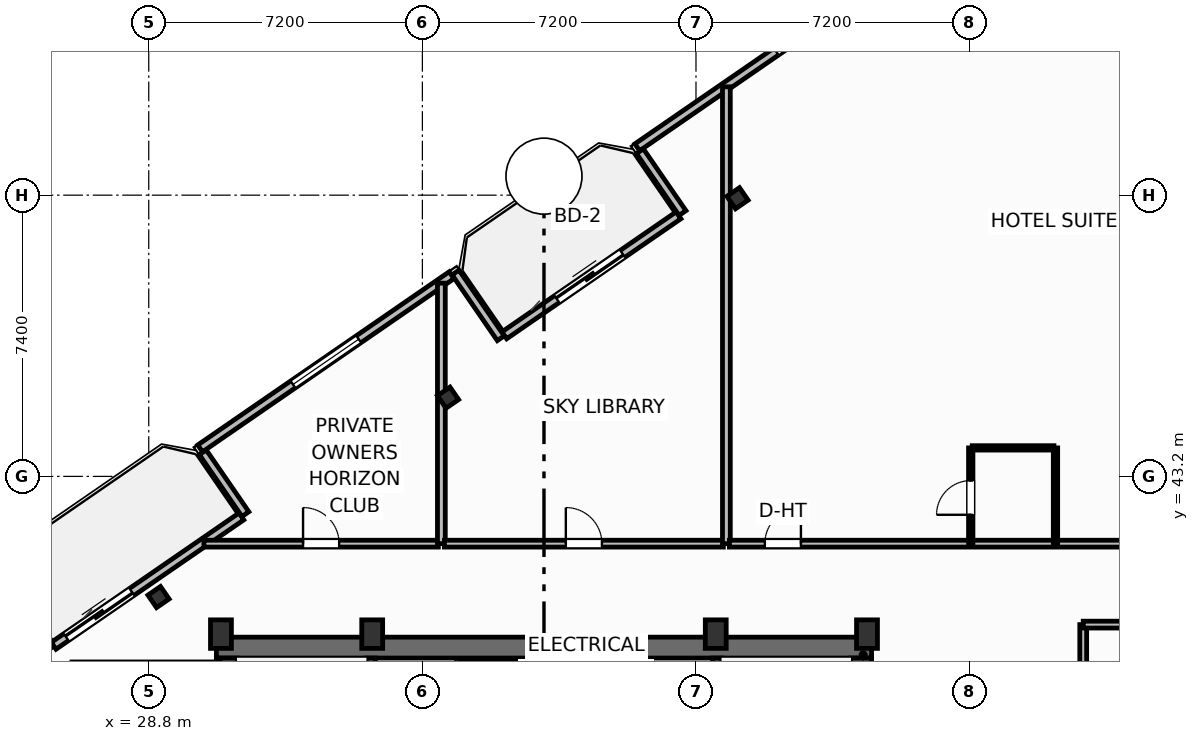
"""IFC4 building model, lengths in metres.
Left out: names, types, materials, properties, quantities, classifications, styles, units other than length and angle.
Written with IfcOpenShell. Run it as: python <this file> out.ifc"""

import sys

from ifc_helpers import new_model, si_unit, direction, frame, frame_2d, origin, origin_2d, place, context, subcontext, project, spatial, rectangle, i_section, extrude, element, fill, save


model = new_model("IFC4")
c1 = context("Model", 3, precision=1e-05, world=origin(), true_north=direction((0.0, 1.0)))
c2 = subcontext(c1, "Body", "Model", "MODEL_VIEW")
j1 = project(units=[si_unit("LENGTHUNIT", "METRE"), si_unit("PLANEANGLEUNIT", "RADIAN")], contexts=[c1])
p1 = place(None, origin())
s1 = spatial("IfcSite", under=j1, at=p1, CompositionType="ELEMENT")
p2 = place(p1, origin())
s2 = spatial("IfcBuilding", under=s1, at=p2, CompositionType="ELEMENT")
p3 = place(p2, frame((0.0, 0.0, 258.2)))
s3 = spatial("IfcBuildingStorey", under=s2, at=p3, CompositionType="ELEMENT", Elevation=258.2)
for number, where, z_axis, x_axis in (
    (1, (30.7, 39.05, 0.0), (0.0, 0.0, 1.0), (1.0, 0.0, 0.0)),
    (2, (34.68, 39.05, 0.0), (0.0, 0.0, 1.0), (1.0, 0.0, 0.0)),
    (3, (43.72, 39.05, 0.0), (0.0, 0.0, 1.0), (1.0, 0.0, 0.0)),
    (4, (47.7, 39.05, 0.0), (0.0, 0.0, 1.0), (1.0, 0.0, 0.0)),
):
    element("IfcColumn", number, at=place(p3, frame(where, z_axis=z_axis, x_axis=x_axis)), inside=s3, PredefinedType="COLUMN", context=c2, shape_type="SweptSolid", body=[
        extrude(rectangle(XDim=0.55, YDim=0.75, at=origin_2d()), origin(), (0.0, 0.0, 1.0), 3.7),
    ])
p4 = place(p3, frame((30.58, 38.695, 0.0), z_axis=(0.0, 0.0, 1.0), x_axis=(1.0, 0.0, 0.0)))
e5 = element("IfcWall", 5, at=p4, inside=s3, PredefinedType="SHEAR", context=c2, shape_type="SweptSolid", body=[
    extrude(rectangle(XDim=17.24, YDim=0.55, at=frame_2d((8.62, 0.0))), origin(), (0.0, 0.0, 1.0), 3.45),
])
for number, where, z_axis, x_axis in (
    (6, (30.855, 29.2, 0.0), (0.0, 0.0, 1.0), (0.0, 1.0, 0.0)),
    (7, (47.545, 29.2, 0.0), (0.0, 0.0, 1.0), (0.0, 1.0, 0.0)),
):
    element("IfcWall", number, at=place(p3, frame(where, z_axis=z_axis, x_axis=x_axis)), inside=s3, PredefinedType="SHEAR", context=c2, shape_type="SweptSolid", body=[
        extrude(rectangle(XDim=9.22, YDim=0.55, at=frame_2d((4.61, 0.0))), origin(), (0.0, 0.0, 1.0), 3.45),
    ])
p5 = place(p3, frame((34.64, 29.2, 0.0), z_axis=(0.0, 0.0, 1.0), x_axis=(0.0, 1.0, 0.0)))
e8 = element("IfcWall", 8, at=p5, inside=s3, PredefinedType="SHEAR", context=c2, shape_type="SweptSolid", body=[
    extrude(rectangle(XDim=9.22, YDim=0.25, at=frame_2d((4.61, 0.0))), origin(), (0.0, 0.0, 1.0), 3.45),
])
p6 = place(p5, frame((0.65, 0.0, 0.0)))
e9 = element("IfcOpeningElement", 9, at=p6, cuts=e8, PredefinedType="OPENING", context=c2, shape_type="SweptSolid", body=[
    extrude(rectangle(XDim=1.05, YDim=2.15, at=frame_2d((0.525, 1.075))), frame((0.0, 0.135, 0.0), z_axis=(0.0, -1.0, 0.0), x_axis=(1.0, 0.0, 0.0)), (0.0, 0.0, 1.0), 0.27),
])
p7 = place(p3, frame((43.76, 29.2, 0.0), z_axis=(0.0, 0.0, 1.0), x_axis=(0.0, 1.0, 0.0)))
e10 = element("IfcWall", 10, at=p7, inside=s3, PredefinedType="SHEAR", context=c2, shape_type="SweptSolid", body=[
    extrude(rectangle(XDim=9.22, YDim=0.25, at=frame_2d((4.61, 0.0))), origin(), (0.0, 0.0, 1.0), 3.45),
])
p8 = place(p7, frame((0.65, 0.0, 0.0)))
e11 = element("IfcOpeningElement", 11, at=p8, cuts=e10, PredefinedType="OPENING", context=c2, shape_type="SweptSolid", body=[
    extrude(rectangle(XDim=1.05, YDim=2.15, at=frame_2d((0.525, 1.075))), frame((0.0, 0.135, 0.0), z_axis=(0.0, -1.0, 0.0), x_axis=(1.0, 0.0, 0.0)), (0.0, 0.0, 1.0), 0.27),
])
for number, where, z_axis, x_axis in (
    (12, (44.292, 50.519, 0.0), (0.0, 0.0, 1.0), (0.824, 0.567, 0.0)),
    (13, (36.675, 45.272, 0.0), (0.0, 0.0, 1.0), (0.824, 0.567, 0.0)),
    (14, (29.057, 40.025, 0.0), (0.0, 0.0, 1.0), (0.824, 0.567, 0.0)),
):
    element("IfcColumn", number, at=place(p3, frame(where, z_axis=z_axis, x_axis=x_axis)), inside=s3, PredefinedType="COLUMN", context=c2, shape_type="SweptSolid", body=[
        extrude(i_section(OverallWidth=0.401, OverallDepth=0.399, WebThickness=0.025, FlangeThickness=0.04, FilletRadius=0.022, at=origin_2d()), origin(), (0.0, 0.0, 1.0), 3.7),
    ])
p9 = place(p3, frame((26.297, 38.743, 0.0), z_axis=(0.0, 0.0, 1.0), x_axis=(0.823534636215, 0.567265989598, 0.0)))
e15 = element("IfcWall", 15, at=p9, inside=s3, PredefinedType="SOLIDWALL", context=c2, shape_type="SweptSolid", body=[
    extrude(rectangle(XDim=6.0, YDim=0.22, at=frame_2d((3.0, 0.0))), origin(), (0.0, 0.0, 1.0), 2.73),
])
p10 = place(p9, frame((0.4, 0.0, 0.0)))
e16 = element("IfcOpeningElement", 16, at=p10, cuts=e15, PredefinedType="OPENING", context=c2, shape_type="SweptSolid", body=[
    extrude(rectangle(XDim=2.1, YDim=2.3, at=frame_2d((1.05, 1.15))), frame((0.0, 0.12, 0.0), z_axis=(0.0, -1.0, 0.0), x_axis=(1.0, 0.0, 0.0)), (0.0, 0.0, 1.0), 0.24),
])
p11 = place(p3, frame((38.156, 46.912, 0.0), z_axis=(0.0, 0.0, 1.0), x_axis=(0.823527178548, 0.567276816195, 0.0)))
e17 = element("IfcWall", 17, at=p11, inside=s3, PredefinedType="SOLIDWALL", context=c2, shape_type="SweptSolid", body=[
    extrude(rectangle(XDim=5.567, YDim=0.22, at=frame_2d((2.783, 0.0))), origin(), (0.0, 0.0, 1.0), 2.73),
])
p12 = place(p11, frame((1.68, 0.0, 0.0)))
e18 = element("IfcOpeningElement", 18, at=p12, cuts=e17, PredefinedType="OPENING", context=c2, shape_type="SweptSolid", body=[
    extrude(rectangle(XDim=2.1, YDim=2.3, at=frame_2d((1.05, 1.15))), frame((0.0, 0.12, 0.0), z_axis=(0.0, -1.0, 0.0), x_axis=(1.0, 0.0, 0.0)), (0.0, 0.0, 1.0), 0.24),
])
p13 = place(p3, frame((50.697, 58.087, 0.0), z_axis=(0.0, 0.0, 1.0), x_axis=(-0.823539455464, -0.567258993137, 0.0)))
e19 = element("IfcWall", 19, at=p13, inside=s3, PredefinedType="SOLIDWALL", context=c2, shape_type="SweptSolid", body=[
    extrude(rectangle(XDim=10.98, YDim=0.22, at=frame_2d((5.49, 0.0))), origin(), (0.0, 0.0, 1.0), 2.73),
])
p14 = place(p13, frame((4.44, 0.0, 0.8)))
e20 = element("IfcOpeningElement", 20, at=p14, cuts=e19, PredefinedType="OPENING", context=c2, shape_type="SweptSolid", body=[
    extrude(rectangle(XDim=2.1, YDim=1.75, at=frame_2d((1.05, 0.875))), frame((0.0, 0.12, 0.0), z_axis=(0.0, -1.0, 0.0), x_axis=(1.0, 0.0, 0.0)), (0.0, 0.0, 1.0), 0.24),
])
p15 = place(p3, frame((41.725, 51.756, 0.0), z_axis=(0.0, 0.0, 1.0), x_axis=(0.567273565974, -0.823529417415, 0.0)))
e21 = element("IfcWall", 21, at=p15, inside=s3, PredefinedType="SOLIDWALL", context=c2, shape_type="SweptSolid", body=[
    extrude(rectangle(XDim=1.975, YDim=0.22, at=frame_2d((0.988, 0.0))), origin(), (0.0, 0.0, 1.0), 2.73),
])
p16 = place(p3, frame((38.063, 46.835, 0.0), z_axis=(0.0, 0.0, 1.0), x_axis=(-0.567219383419, 0.823566737474, 0.0)))
e22 = element("IfcWall", 22, at=p16, inside=s3, PredefinedType="SOLIDWALL", context=c2, shape_type="SweptSolid", body=[
    extrude(rectangle(XDim=2.1, YDim=0.22, at=frame_2d((1.05, 0.0))), origin(), (0.0, 0.0, 1.0), 2.73),
])
p17 = place(p3, frame((36.769, 48.494, 0.0), z_axis=(0.0, 0.0, 1.0), x_axis=(-0.823521165086, -0.56728554596, 0.0)))
e23 = element("IfcWall", 23, at=p17, inside=s3, PredefinedType="SOLIDWALL", context=c2, shape_type="SweptSolid", body=[
    extrude(rectangle(XDim=8.035, YDim=0.22, at=frame_2d((4.018, 0.0))), origin(), (0.0, 0.0, 1.0), 2.73),
])
p18 = place(p17, frame((2.968, 0.0, 0.8)))
e24 = element("IfcOpeningElement", 24, at=p18, cuts=e23, PredefinedType="OPENING", context=c2, shape_type="SweptSolid", body=[
    extrude(rectangle(XDim=2.1, YDim=1.75, at=frame_2d((1.05, 0.875))), frame((0.0, 0.12, 0.0), z_axis=(0.0, -1.0, 0.0), x_axis=(1.0, 0.0, 0.0)), (0.0, 0.0, 1.0), 0.24),
])
p19 = place(p3, frame((30.223, 43.833, 0.0), z_axis=(0.0, 0.0, 1.0), x_axis=(0.567215821234, -0.823569190865, 0.0)))
e25 = element("IfcWall", 25, at=p19, inside=s3, PredefinedType="SOLIDWALL", context=c2, shape_type="SweptSolid", body=[
    extrude(rectangle(XDim=1.975, YDim=0.22, at=frame_2d((0.988, 0.0))), origin(), (0.0, 0.0, 1.0), 2.73),
])
p20 = place(p3, frame((26.204, 38.667, 0.0), z_axis=(0.0, 0.0, 1.0), x_axis=(-0.567219383419, 0.823566737474, 0.0)))
e26 = element("IfcWall", 26, at=p20, inside=s3, PredefinedType="SOLIDWALL", context=c2, shape_type="SweptSolid", body=[
    extrude(rectangle(XDim=2.1, YDim=0.22, at=frame_2d((1.05, 0.0))), origin(), (0.0, 0.0, 1.0), 2.73),
])
p21 = place(p3, frame((30.251, 41.43, 0.0), z_axis=(0.0, 0.0, 1.0), x_axis=(1.0, 0.0, 0.0)))
e27 = element("IfcWall", 27, at=p21, inside=s3, PredefinedType="PARTITIONING", context=c2, shape_type="SweptSolid", body=[
    extrude(rectangle(XDim=6.169, YDim=0.18, at=frame_2d((3.084, 0.0))), origin(), (0.0, 0.0, 1.0), 3.45),
])
p22 = place(p21, frame((2.609, 0.0, 0.0)))
e28 = element("IfcOpeningElement", 28, at=p22, cuts=e27, PredefinedType="OPENING", context=c2, shape_type="SweptSolid", body=[
    extrude(rectangle(XDim=0.95, YDim=2.05, at=frame_2d((0.475, 1.025))), frame((0.0, 0.1, 0.0), z_axis=(0.0, -1.0, 0.0), x_axis=(1.0, 0.0, 0.0)), (0.0, 0.0, 1.0), 0.2),
])
p23 = place(p3, frame((36.5, 41.43, 0.0), z_axis=(0.0, 0.0, 1.0), x_axis=(0.0, 1.0, 0.0)))
e29 = element("IfcWall", 29, at=p23, inside=s3, PredefinedType="PARTITIONING", context=c2, shape_type="SweptSolid", body=[
    extrude(rectangle(XDim=6.854, YDim=0.205, at=frame_2d((3.427, 0.0))), origin(), (0.0, 0.0, 1.0), 2.739),
])
p24 = place(p3, frame((36.58, 41.43, 0.0), z_axis=(0.0, 0.0, 1.0), x_axis=(1.0, 0.0, 0.0)))
e30 = element("IfcWall", 30, at=p24, inside=s3, PredefinedType="PARTITIONING", context=c2, shape_type="SweptSolid", body=[
    extrude(rectangle(XDim=7.34, YDim=0.18, at=frame_2d((3.67, 0.0))), origin(), (0.0, 0.0, 1.0), 3.45),
])
p25 = place(p24, frame((3.195, 0.0, 0.0)))
e31 = element("IfcOpeningElement", 31, at=p25, cuts=e30, PredefinedType="OPENING", context=c2, shape_type="SweptSolid", body=[
    extrude(rectangle(XDim=0.95, YDim=2.05, at=frame_2d((0.475, 1.025))), frame((0.0, 0.1, 0.0), z_axis=(0.0, -1.0, 0.0), x_axis=(1.0, 0.0, 0.0)), (0.0, 0.0, 1.0), 0.2),
])
p26 = place(p3, frame((44.0, 41.43, 0.0), z_axis=(0.0, 0.0, 1.0), x_axis=(0.0, 1.0, 0.0)))
e32 = element("IfcWall", 32, at=p26, inside=s3, PredefinedType="PARTITIONING", context=c2, shape_type="SweptSolid", body=[
    extrude(rectangle(XDim=12.021, YDim=0.205, at=frame_2d((6.01, 0.0))), origin(), (0.0, 0.0, 1.0), 2.739),
])
p27 = place(p3, frame((44.08, 41.43, 0.0), z_axis=(0.0, 0.0, 1.0), x_axis=(1.0, 0.0, 0.0)))
e33 = element("IfcWall", 33, at=p27, inside=s3, PredefinedType="PARTITIONING", context=c2, shape_type="SweptSolid", body=[
    extrude(rectangle(XDim=23.992, YDim=0.18, at=frame_2d((11.996, 0.0))), origin(), (0.0, 0.0, 1.0), 3.45),
])
p28 = place(p27, frame((0.931, 0.0, 0.0)))
e34 = element("IfcOpeningElement", 34, at=p28, cuts=e33, PredefinedType="OPENING", context=c2, shape_type="SweptSolid", body=[
    extrude(rectangle(XDim=0.95, YDim=2.15, at=frame_2d((0.475, 1.075))), frame((0.0, 0.1, 0.0), z_axis=(0.0, -1.0, 0.0), x_axis=(1.0, 0.0, 0.0)), (0.0, 0.0, 1.0), 0.2),
])
p29 = place(p3, frame((50.47, 43.95, 0.0), z_axis=(0.0, 0.0, 1.0), x_axis=(1.0, 0.0, 0.0)))
e35 = element("IfcWall", 35, at=p29, inside=s3, PredefinedType="PARTITIONING", context=c2, shape_type="SweptSolid", body=[
    extrude(rectangle(XDim=2.15, YDim=0.115, at=frame_2d((1.075, 0.0))), origin(), (0.0, 0.0, 1.0), 3.45),
])
p30 = place(p3, frame((50.43, 41.43, 0.0), z_axis=(0.0, 0.0, 1.0), x_axis=(0.0, 1.0, 0.0)))
e36 = element("IfcWall", 36, at=p30, inside=s3, PredefinedType="PARTITIONING", context=c2, shape_type="SweptSolid", body=[
    extrude(rectangle(XDim=2.52, YDim=0.115, at=frame_2d((1.26, 0.0))), origin(), (0.0, 0.0, 1.0), 3.45),
])
p31 = place(p30, frame((0.76, 0.0, 0.0)))
e37 = element("IfcOpeningElement", 37, at=p31, cuts=e36, PredefinedType="OPENING", context=c2, shape_type="SweptSolid", body=[
    extrude(rectangle(XDim=0.9, YDim=2.05, at=frame_2d((0.45, 1.025))), frame((0.0, 0.067, 0.0), z_axis=(0.0, -1.0, 0.0), x_axis=(1.0, 0.0, 0.0)), (0.0, 0.0, 1.0), 0.135),
])
p32 = place(p3, frame((52.66, 41.43, 0.0), z_axis=(0.0, 0.0, 1.0), x_axis=(0.0, 1.0, 0.0)))
e38 = element("IfcWall", 38, at=p32, inside=s3, PredefinedType="PARTITIONING", context=c2, shape_type="SweptSolid", body=[
    extrude(rectangle(XDim=2.52, YDim=0.115, at=frame_2d((1.26, 0.0))), origin(), (0.0, 0.0, 1.0), 3.45),
])
p33 = place(p3, frame((53.39, 19.24, 0.0), z_axis=(0.0, 0.0, 1.0), x_axis=(0.0, 1.0, 0.0)))
e39 = element("IfcWall", 39, at=p33, inside=s3, PredefinedType="PARTITIONING", context=c2, shape_type="SweptSolid", body=[
    extrude(rectangle(XDim=20.06, YDim=0.18, at=frame_2d((10.03, 0.0))), origin(), (0.0, 0.0, 1.0), 3.45),
])
p34 = place(p33, frame((7.7, 0.0, 0.0)))
e40 = element("IfcOpeningElement", 40, at=p34, cuts=e39, PredefinedType="OPENING", context=c2, shape_type="SweptSolid", body=[
    extrude(rectangle(XDim=0.95, YDim=2.05, at=frame_2d((0.475, 1.025))), frame((0.0, 0.1, 0.0), z_axis=(0.0, -1.0, 0.0), x_axis=(1.0, 0.0, 0.0)), (0.0, 0.0, 1.0), 0.2),
])
p35 = place(p3, frame((53.39, 39.3, 0.0), z_axis=(0.0, 0.0, 1.0), x_axis=(1.0, 0.0, 0.0)))
e41 = element("IfcWall", 41, at=p35, inside=s3, PredefinedType="PARTITIONING", context=c2, shape_type="SweptSolid", body=[
    extrude(rectangle(XDim=16.149, YDim=0.18, at=frame_2d((8.075, 0.0))), origin(), (0.0, 0.0, 1.0), 2.739),
])
p36 = place(p10, origin())
e42 = element("IfcDoor", 42, at=p36, inside=s3, OperationType="SLIDING_TO_LEFT", PredefinedType="DOOR", context=c2, shape_type="SweptSolid", body=[
    extrude(rectangle(XDim=2.1, YDim=2.3, at=frame_2d((1.05, 1.15))), frame((0.0, 0.025, 0.0), z_axis=(0.0, -1.0, 0.0), x_axis=(1.0, 0.0, 0.0)), (0.0, 0.0, 1.0), 0.05),
])
fill(e16, e42)
p37 = place(p12, origin())
e43 = element("IfcDoor", 43, at=p37, inside=s3, OperationType="SLIDING_TO_LEFT", PredefinedType="DOOR", context=c2, shape_type="SweptSolid", body=[
    extrude(rectangle(XDim=2.1, YDim=2.3, at=frame_2d((1.05, 1.15))), frame((0.0, 0.025, 0.0), z_axis=(0.0, -1.0, 0.0), x_axis=(1.0, 0.0, 0.0)), (0.0, 0.0, 1.0), 0.05),
])
fill(e18, e43)
p38 = place(p14, origin())
e44 = element("IfcWindow", 44, at=p38, inside=s3, PartitioningType="SINGLE_PANEL", PredefinedType="WINDOW", context=c2, shape_type="SweptSolid", body=[
    extrude(rectangle(XDim=2.1, YDim=1.75, at=frame_2d((1.05, 0.875))), frame((0.0, 0.03, 0.0), z_axis=(0.0, -1.0, 0.0), x_axis=(1.0, 0.0, 0.0)), (0.0, 0.0, 1.0), 0.06),
])
fill(e20, e44)
p39 = place(p18, origin())
e45 = element("IfcWindow", 45, at=p39, inside=s3, PartitioningType="SINGLE_PANEL", PredefinedType="WINDOW", context=c2, shape_type="SweptSolid", body=[
    extrude(rectangle(XDim=2.1, YDim=1.75, at=frame_2d((1.05, 0.875))), frame((0.0, 0.03, 0.0), z_axis=(0.0, -1.0, 0.0), x_axis=(1.0, 0.0, 0.0)), (0.0, 0.0, 1.0), 0.06),
])
fill(e24, e45)
p40 = place(p22, origin())
e46 = element("IfcDoor", 46, at=p40, inside=s3, OperationType="SINGLE_SWING_LEFT", PredefinedType="DOOR", context=c2, shape_type="SweptSolid", body=[
    extrude(rectangle(XDim=0.95, YDim=2.05, at=frame_2d((0.475, 1.025))), frame((0.0, 0.025, 0.0), z_axis=(0.0, -1.0, 0.0), x_axis=(1.0, 0.0, 0.0)), (0.0, 0.0, 1.0), 0.05),
])
fill(e28, e46)
p41 = place(p25, origin())
e47 = element("IfcDoor", 47, at=p41, inside=s3, OperationType="SINGLE_SWING_LEFT", PredefinedType="DOOR", context=c2, shape_type="SweptSolid", body=[
    extrude(rectangle(XDim=0.95, YDim=2.05, at=frame_2d((0.475, 1.025))), frame((0.0, 0.025, 0.0), z_axis=(0.0, -1.0, 0.0), x_axis=(1.0, 0.0, 0.0)), (0.0, 0.0, 1.0), 0.05),
])
fill(e31, e47)
p42 = place(p28, origin())
e48 = element("IfcDoor", 48, at=p42, inside=s3, OperationType="SINGLE_SWING_RIGHT", PredefinedType="DOOR", context=c2, shape_type="SweptSolid", body=[
    extrude(rectangle(XDim=0.95, YDim=2.15, at=frame_2d((0.475, 1.075))), frame((0.0, 0.025, 0.0), z_axis=(0.0, -1.0, 0.0), x_axis=(1.0, 0.0, 0.0)), (0.0, 0.0, 1.0), 0.05),
])
fill(e34, e48)
p43 = place(p31, origin())
e49 = element("IfcDoor", 49, at=p43, inside=s3, OperationType="SINGLE_SWING_LEFT", PredefinedType="DOOR", context=c2, shape_type="SweptSolid", body=[
    extrude(rectangle(XDim=0.9, YDim=2.05, at=frame_2d((0.45, 1.025))), frame((0.0, 0.025, 0.0), z_axis=(0.0, -1.0, 0.0), x_axis=(1.0, 0.0, 0.0)), (0.0, 0.0, 1.0), 0.05),
])
fill(e37, e49)
save(model, sys.argv[1])
